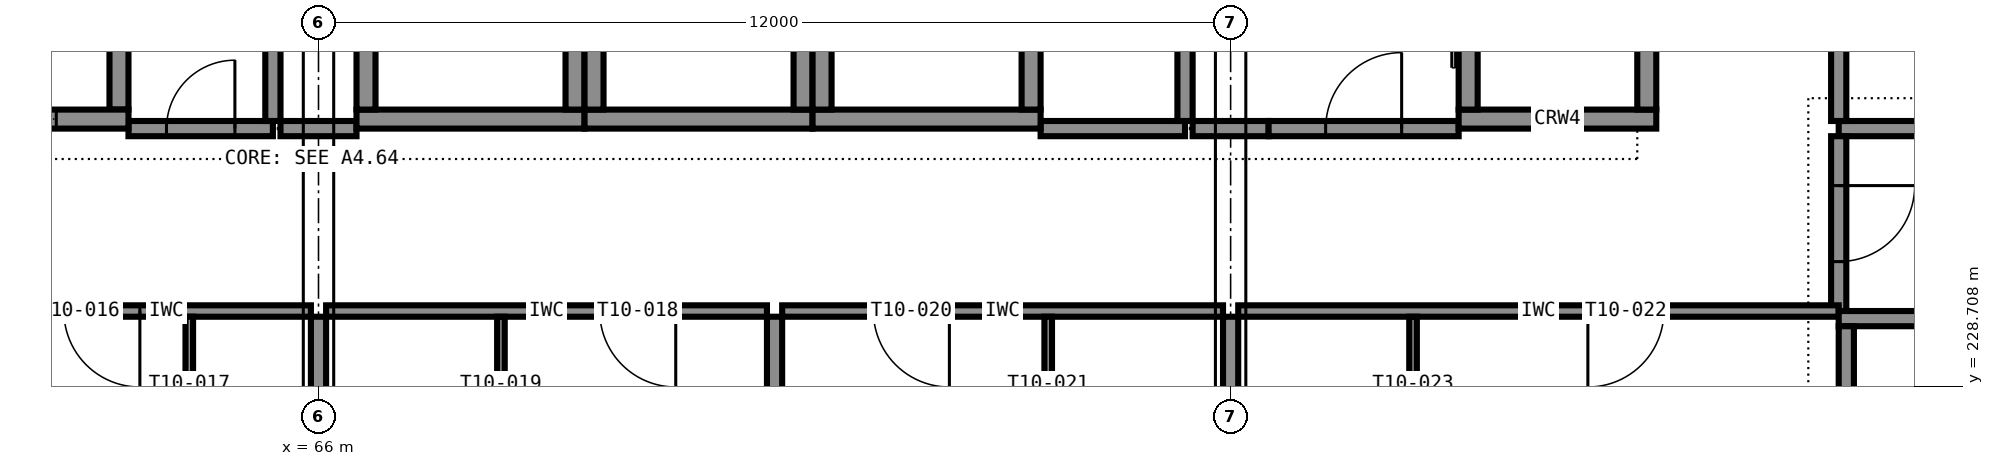
"""IFC4 building model, lengths in metres.
Left out: names, types, materials, properties, quantities, classifications, styles, units other than length and angle.
Written with IfcOpenShell. Run it as: python <this file> out.ifc"""

import sys

from ifc_helpers import new_model, si_unit, direction, frame, frame_2d, origin, place, context, subcontext, project, spatial, rectangle, extrude, element, fill, save


model = new_model("IFC4")
c1 = context("Model", 3, precision=1e-05, world=origin(), true_north=direction((0.0, 1.0)))
c2 = subcontext(c1, "Body", "Model", "MODEL_VIEW")
j1 = project(units=[si_unit("LENGTHUNIT", "METRE"), si_unit("PLANEANGLEUNIT", "RADIAN")], contexts=[c1])
p1 = place(None, origin())
s1 = spatial("IfcSite", under=j1, at=p1, CompositionType="ELEMENT")
p2 = place(p1, origin())
s2 = spatial("IfcBuilding", under=s1, at=p2, CompositionType="ELEMENT")
p3 = place(p2, frame((0.0, 0.0, 49.8)))
s3 = spatial("IfcBuildingStorey", under=s2, at=p3, CompositionType="ELEMENT", Elevation=49.8)
p4 = place(p3, frame((60.5, 232.225, 0.0), z_axis=(0.0, 0.0, 1.0), x_axis=(1.0, 0.0, 0.0)))
e1 = element("IfcWall", 1, at=p4, inside=s3, PredefinedType="SHEAR", context=c2, shape_type="SweptSolid", body=[
    extrude(rectangle(XDim=3.0, YDim=0.25, at=frame_2d((1.5, 0.0))), origin(), (0.0, 0.0, 1.0), 3.6),
])
p5 = place(p4, frame((0.95, 0.0, 0.0)))
e2 = element("IfcOpeningElement", 2, at=p5, cuts=e1, PredefinedType="OPENING", context=c2, shape_type="SweptSolid", body=[
    extrude(rectangle(XDim=1.1, YDim=2.1, at=frame_2d((0.55, 1.05))), frame((0.0, 0.135, 0.0), z_axis=(0.0, -1.0, 0.0), x_axis=(1.0, 0.0, 0.0)), (0.0, 0.0, 1.0), 0.27),
])
p6 = place(p3, frame((63.375, 232.35, 0.0), z_axis=(0.0, 0.0, 1.0), x_axis=(0.0, 1.0, 0.0)))
e3 = element("IfcWall", 3, at=p6, inside=s3, PredefinedType="SHEAR", context=c2, shape_type="SweptSolid", body=[
    extrude(rectangle(XDim=3.3, YDim=0.25, at=frame_2d((1.65, 0.0))), origin(), (0.0, 0.0, 1.0), 3.6),
])
p7 = place(p3, frame((66.5, 232.225, 0.0), z_axis=(0.0, 0.0, 1.0), x_axis=(1.0, 0.0, 0.0)))
e4 = element("IfcWall", 4, at=p7, inside=s3, PredefinedType="SHEAR", context=c2, shape_type="SweptSolid", body=[
    extrude(rectangle(XDim=3.0, YDim=0.25, at=frame_2d((1.5, 0.0))), origin(), (0.0, 0.0, 1.0), 3.6),
])
for number, where, z_axis, x_axis in (
    (5, (66.625, 232.35, 0.0), (0.0, 0.0, 1.0), (0.0, 1.0, 0.0)),
    (6, (69.375, 232.35, 0.0), (0.0, 0.0, 1.0), (0.0, 1.0, 0.0)),
):
    element("IfcWall", number, at=place(p3, frame(where, z_axis=z_axis, x_axis=x_axis)), inside=s3, PredefinedType="SHEAR", context=c2, shape_type="SweptSolid", body=[
        extrude(rectangle(XDim=3.3, YDim=0.25, at=frame_2d((1.65, 0.0))), origin(), (0.0, 0.0, 1.0), 3.6),
    ])
p8 = place(p3, frame((69.5, 232.225, 0.0), z_axis=(0.0, 0.0, 1.0), x_axis=(1.0, 0.0, 0.0)))
e7 = element("IfcWall", 7, at=p8, inside=s3, PredefinedType="SHEAR", context=c2, shape_type="SweptSolid", body=[
    extrude(rectangle(XDim=3.0, YDim=0.25, at=frame_2d((1.5, 0.0))), origin(), (0.0, 0.0, 1.0), 3.6),
])
for number, where, z_axis, x_axis in (
    (8, (69.625, 232.35, 0.0), (0.0, 0.0, 1.0), (0.0, 1.0, 0.0)),
    (9, (72.375, 232.35, 0.0), (0.0, 0.0, 1.0), (0.0, 1.0, 0.0)),
):
    element("IfcWall", number, at=place(p3, frame(where, z_axis=z_axis, x_axis=x_axis)), inside=s3, PredefinedType="SHEAR", context=c2, shape_type="SweptSolid", body=[
        extrude(rectangle(XDim=3.3, YDim=0.25, at=frame_2d((1.65, 0.0))), origin(), (0.0, 0.0, 1.0), 3.6),
    ])
p9 = place(p3, frame((72.5, 232.225, 0.0), z_axis=(0.0, 0.0, 1.0), x_axis=(1.0, 0.0, 0.0)))
e10 = element("IfcWall", 10, at=p9, inside=s3, PredefinedType="SHEAR", context=c2, shape_type="SweptSolid", body=[
    extrude(rectangle(XDim=3.0, YDim=0.25, at=frame_2d((1.5, 0.0))), origin(), (0.0, 0.0, 1.0), 3.6),
])
for number, where, z_axis, x_axis in (
    (11, (72.625, 232.35, 0.0), (0.0, 0.0, 1.0), (0.0, 1.0, 0.0)),
    (12, (75.375, 232.35, 0.0), (0.0, 0.0, 1.0), (0.0, 1.0, 0.0)),
):
    element("IfcWall", number, at=place(p3, frame(where, z_axis=z_axis, x_axis=x_axis)), inside=s3, PredefinedType="SHEAR", context=c2, shape_type="SweptSolid", body=[
        extrude(rectangle(XDim=3.3, YDim=0.25, at=frame_2d((1.65, 0.0))), origin(), (0.0, 0.0, 1.0), 3.6),
    ])
p10 = place(p3, frame((81.0, 232.225, 0.0), z_axis=(0.0, 0.0, 1.0), x_axis=(1.0, 0.0, 0.0)))
e13 = element("IfcWall", 13, at=p10, inside=s3, PredefinedType="SHEAR", context=c2, shape_type="SweptSolid", body=[
    extrude(rectangle(XDim=2.6, YDim=0.25, at=frame_2d((1.3, 0.0))), origin(), (0.0, 0.0, 1.0), 3.6),
])
p11 = place(p3, frame((81.125, 232.35, 0.0), z_axis=(0.0, 0.0, 1.0), x_axis=(0.0, 1.0, 0.0)))
e14 = element("IfcWall", 14, at=p11, inside=s3, PredefinedType="SHEAR", context=c2, shape_type="SweptSolid", body=[
    extrude(rectangle(XDim=3.3, YDim=0.25, at=frame_2d((1.65, 0.0))), origin(), (0.0, 0.0, 1.0), 3.6),
])
p12 = place(p11, frame((1.1, 0.0, 0.0)))
e15 = element("IfcOpeningElement", 15, at=p12, cuts=e14, PredefinedType="OPENING", context=c2, shape_type="SweptSolid", body=[
    extrude(rectangle(XDim=1.1, YDim=2.1, at=frame_2d((0.55, 1.05))), frame((0.0, 0.135, 0.0), z_axis=(0.0, -1.0, 0.0), x_axis=(1.0, 0.0, 0.0)), (0.0, 0.0, 1.0), 0.27),
])
p13 = place(p3, frame((83.475, 232.35, 0.0), z_axis=(0.0, 0.0, 1.0), x_axis=(0.0, 1.0, 0.0)))
e16 = element("IfcWall", 16, at=p13, inside=s3, PredefinedType="SHEAR", context=c2, shape_type="SweptSolid", body=[
    extrude(rectangle(XDim=3.3, YDim=0.25, at=frame_2d((1.65, 0.0))), origin(), (0.0, 0.0, 1.0), 3.6),
])
p14 = place(p3, frame((89.5, 229.6, 0.0), z_axis=(0.0, 0.0, 1.0), x_axis=(-1.0, 0.0, 0.0)))
e17 = element("IfcWall", 17, at=p14, inside=s3, PredefinedType="SHEAR", context=c2, shape_type="SweptSolid", body=[
    extrude(rectangle(XDim=3.5, YDim=0.2, at=frame_2d((1.75, 0.0))), origin(), (0.0, 0.0, 1.0), 3.6),
])
p15 = place(p14, frame((1.15, 0.0, 0.0)))
e18 = element("IfcOpeningElement", 18, at=p15, cuts=e17, PredefinedType="OPENING", context=c2, shape_type="SweptSolid", body=[
    extrude(rectangle(XDim=1.2, YDim=2.1, at=frame_2d((0.6, 1.05))), frame((0.0, 0.11, 0.0), z_axis=(0.0, -1.0, 0.0), x_axis=(1.0, 0.0, 0.0)), (0.0, 0.0, 1.0), 0.22),
])
p16 = place(p3, frame((86.1, 222.0, 0.0), z_axis=(0.0, 0.0, 1.0), x_axis=(0.0, 1.0, 0.0)))
e19 = element("IfcWall", 19, at=p16, inside=s3, PredefinedType="SHEAR", context=c2, shape_type="SweptSolid", body=[
    extrude(rectangle(XDim=7.5, YDim=0.2, at=frame_2d((3.75, 0.0))), origin(), (0.0, 0.0, 1.0), 3.6),
])
p17 = place(p3, frame((63.5, 232.1, 0.0), z_axis=(0.0, 0.0, 1.0), x_axis=(1.0, 0.0, 0.0)))
e20 = element("IfcWall", 20, at=p17, inside=s3, PredefinedType="PARTITIONING", context=c2, shape_type="SweptSolid", body=[
    extrude(rectangle(XDim=1.9, YDim=0.2, at=frame_2d((0.95, 0.0))), origin(), (0.0, 0.0, 1.0), 3.4),
])
p18 = place(p17, frame((0.5, 0.0, 0.0)))
e21 = element("IfcOpeningElement", 21, at=p18, cuts=e20, PredefinedType="OPENING", context=c2, shape_type="SweptSolid", body=[
    extrude(rectangle(XDim=0.9, YDim=2.1, at=frame_2d((0.45, 1.05))), frame((0.0, 0.11, 0.0), z_axis=(0.0, -1.0, 0.0), x_axis=(1.0, 0.0, 0.0)), (0.0, 0.0, 1.0), 0.22),
])
p19 = place(p3, frame((65.5, 232.1, 0.0), z_axis=(0.0, 0.0, 1.0), x_axis=(1.0, 0.0, 0.0)))
e22 = element("IfcWall", 22, at=p19, inside=s3, PredefinedType="PARTITIONING", context=c2, shape_type="SweptSolid", body=[
    extrude(rectangle(XDim=1.0, YDim=0.2, at=frame_2d((0.5, 0.0))), origin(), (0.0, 0.0, 1.0), 3.4),
])
p20 = place(p3, frame((75.5, 232.1, 0.0), z_axis=(0.0, 0.0, 1.0), x_axis=(1.0, 0.0, 0.0)))
e23 = element("IfcWall", 23, at=p20, inside=s3, PredefinedType="PARTITIONING", context=c2, shape_type="SweptSolid", body=[
    extrude(rectangle(XDim=1.9, YDim=0.2, at=frame_2d((0.95, 0.0))), origin(), (0.0, 0.0, 1.0), 3.4),
])
p21 = place(p3, frame((77.5, 232.1, 0.0), z_axis=(0.0, 0.0, 1.0), x_axis=(1.0, 0.0, 0.0)))
e24 = element("IfcWall", 24, at=p21, inside=s3, PredefinedType="PARTITIONING", context=c2, shape_type="SweptSolid", body=[
    extrude(rectangle(XDim=1.0, YDim=0.2, at=frame_2d((0.5, 0.0))), origin(), (0.0, 0.0, 1.0), 3.4),
])
p22 = place(p3, frame((78.5, 232.1, 0.0), z_axis=(0.0, 0.0, 1.0), x_axis=(1.0, 0.0, 0.0)))
e25 = element("IfcWall", 25, at=p22, inside=s3, PredefinedType="PARTITIONING", context=c2, shape_type="SweptSolid", body=[
    extrude(rectangle(XDim=2.5, YDim=0.2, at=frame_2d((1.25, 0.0))), origin(), (0.0, 0.0, 1.0), 3.4),
])
p23 = place(p22, frame((0.75, 0.0, 0.0)))
e26 = element("IfcOpeningElement", 26, at=p23, cuts=e25, PredefinedType="OPENING", context=c2, shape_type="SweptSolid", body=[
    extrude(rectangle(XDim=1.0, YDim=2.1, at=frame_2d((0.5, 1.05))), frame((0.0, 0.11, 0.0), z_axis=(0.0, -1.0, 0.0), x_axis=(1.0, 0.0, 0.0)), (0.0, 0.0, 1.0), 0.22),
])
p24 = place(p3, frame((86.0, 232.1, 0.0), z_axis=(0.0, 0.0, 1.0), x_axis=(1.0, 0.0, 0.0)))
e27 = element("IfcWall", 27, at=p24, inside=s3, PredefinedType="PARTITIONING", context=c2, shape_type="SweptSolid", body=[
    extrude(rectangle(XDim=3.7, YDim=0.2, at=frame_2d((1.85, 0.0))), origin(), (0.0, 0.0, 1.0), 3.4),
])
for number, where, z_axis, x_axis in (
    (28, (65.4, 232.2, 0.0), (0.0, 0.0, 1.0), (0.0, 1.0, 0.0)),
    (29, (77.4, 232.2, 0.0), (0.0, 0.0, 1.0), (0.0, 1.0, 0.0)),
):
    element("IfcWall", number, at=place(p3, frame(where, z_axis=z_axis, x_axis=x_axis)), inside=s3, PredefinedType="PARTITIONING", context=c2, shape_type="SweptSolid", body=[
        extrude(rectangle(XDim=3.6, YDim=0.2, at=frame_2d((1.8, 0.0))), origin(), (0.0, 0.0, 1.0), 3.4),
    ])
p25 = place(p3, frame((86.0, 235.8, 0.0), z_axis=(0.0, 0.0, 1.0), x_axis=(0.0, -1.0, 0.0)))
e30 = element("IfcWall", 30, at=p25, inside=s3, PredefinedType="PARTITIONING", context=c2, shape_type="SweptSolid", body=[
    extrude(rectangle(XDim=3.6, YDim=0.2, at=frame_2d((1.8, 0.0))), origin(), (0.0, 0.0, 1.0), 3.4),
])
p26 = place(p25, frame((1.35, 0.0, 0.0)))
e31 = element("IfcOpeningElement", 31, at=p26, cuts=e30, PredefinedType="OPENING", context=c2, shape_type="SweptSolid", body=[
    extrude(rectangle(XDim=0.9, YDim=2.1, at=frame_2d((0.45, 1.05))), frame((0.0, 0.11, 0.0), z_axis=(0.0, -1.0, 0.0), x_axis=(1.0, 0.0, 0.0)), (0.0, 0.0, 1.0), 0.22),
])
p27 = place(p3, frame((86.0, 232.0, 0.0), z_axis=(0.0, 0.0, 1.0), x_axis=(0.0, -1.0, 0.0)))
e32 = element("IfcWall", 32, at=p27, inside=s3, PredefinedType="PARTITIONING", context=c2, shape_type="SweptSolid", body=[
    extrude(rectangle(XDim=2.3, YDim=0.2, at=frame_2d((1.15, 0.0))), origin(), (0.0, 0.0, 1.0), 3.4),
])
p28 = place(p27, frame((0.65, 0.0, 0.0)))
e33 = element("IfcOpeningElement", 33, at=p28, cuts=e32, PredefinedType="OPENING", context=c2, shape_type="SweptSolid", body=[
    extrude(rectangle(XDim=1.0, YDim=2.1, at=frame_2d((0.5, 1.05))), frame((0.0, 0.11, 0.0), z_axis=(0.0, -1.0, 0.0), x_axis=(1.0, 0.0, 0.0)), (0.0, 0.0, 1.0), 0.22),
])
p29 = place(p3, frame((65.9, 229.7, 0.0), z_axis=(0.0, 0.0, 1.0), x_axis=(-1.0, 0.0, 0.0)))
e34 = element("IfcWall", 34, at=p29, inside=s3, PredefinedType="PARTITIONING", context=c2, shape_type="SweptSolid", body=[
    extrude(rectangle(XDim=3.8, YDim=0.15, at=frame_2d((1.9, 0.0))), origin(), (0.0, 0.0, 1.0), 3.4),
])
p30 = place(p29, frame((2.25, 0.0, 0.0)))
e35 = element("IfcOpeningElement", 35, at=p30, cuts=e34, PredefinedType="OPENING", context=c2, shape_type="SweptSolid", body=[
    extrude(rectangle(XDim=1.0, YDim=2.1, at=frame_2d((0.5, 1.05))), frame((0.0, 0.085, 0.0), z_axis=(0.0, -1.0, 0.0), x_axis=(1.0, 0.0, 0.0)), (0.0, 0.0, 1.0), 0.17),
])
p31 = place(p3, frame((64.3, 226.75, 0.0), z_axis=(0.0, 0.0, 1.0), x_axis=(0.0, 1.0, 0.0)))
e36 = element("IfcWall", 36, at=p31, inside=s3, PredefinedType="PARTITIONING", context=c2, shape_type="SweptSolid", body=[
    extrude(rectangle(XDim=2.875, YDim=0.1, at=frame_2d((1.438, 0.0))), origin(), (0.0, 0.0, 1.0), 3.4),
])
p32 = place(p31, frame((1.038, 0.0, 0.0)))
e37 = element("IfcOpeningElement", 37, at=p32, cuts=e36, PredefinedType="OPENING", context=c2, shape_type="SweptSolid", body=[
    extrude(rectangle(XDim=0.8, YDim=2.1, at=frame_2d((0.4, 1.05))), frame((0.0, 0.06, 0.0), z_axis=(0.0, -1.0, 0.0), x_axis=(1.0, 0.0, 0.0)), (0.0, 0.0, 1.0), 0.12),
])
p33 = place(p3, frame((71.9, 229.7, 0.0), z_axis=(0.0, 0.0, 1.0), x_axis=(-1.0, 0.0, 0.0)))
e38 = element("IfcWall", 38, at=p33, inside=s3, PredefinedType="PARTITIONING", context=c2, shape_type="SweptSolid", body=[
    extrude(rectangle(XDim=5.8, YDim=0.15, at=frame_2d((2.9, 0.0))), origin(), (0.0, 0.0, 1.0), 3.4),
])
p34 = place(p33, frame((1.2, 0.0, 0.0)))
e39 = element("IfcOpeningElement", 39, at=p34, cuts=e38, PredefinedType="OPENING", context=c2, shape_type="SweptSolid", body=[
    extrude(rectangle(XDim=1.0, YDim=2.1, at=frame_2d((0.5, 1.05))), frame((0.0, 0.085, 0.0), z_axis=(0.0, -1.0, 0.0), x_axis=(1.0, 0.0, 0.0)), (0.0, 0.0, 1.0), 0.17),
])
p35 = place(p3, frame((68.4, 229.625, 0.0), z_axis=(0.0, 0.0, 1.0), x_axis=(0.0, -1.0, 0.0)))
e40 = element("IfcWall", 40, at=p35, inside=s3, PredefinedType="PARTITIONING", context=c2, shape_type="SweptSolid", body=[
    extrude(rectangle(XDim=2.875, YDim=0.1, at=frame_2d((1.438, 0.0))), origin(), (0.0, 0.0, 1.0), 3.4),
])
p36 = place(p35, frame((1.038, 0.0, 0.0)))
e41 = element("IfcOpeningElement", 41, at=p36, cuts=e40, PredefinedType="OPENING", context=c2, shape_type="SweptSolid", body=[
    extrude(rectangle(XDim=0.8, YDim=2.1, at=frame_2d((0.4, 1.05))), frame((0.0, 0.06, 0.0), z_axis=(0.0, -1.0, 0.0), x_axis=(1.0, 0.0, 0.0)), (0.0, 0.0, 1.0), 0.12),
])
p37 = place(p3, frame((77.9, 229.7, 0.0), z_axis=(0.0, 0.0, 1.0), x_axis=(-1.0, 0.0, 0.0)))
e42 = element("IfcWall", 42, at=p37, inside=s3, PredefinedType="PARTITIONING", context=c2, shape_type="SweptSolid", body=[
    extrude(rectangle(XDim=5.8, YDim=0.15, at=frame_2d((2.9, 0.0))), origin(), (0.0, 0.0, 1.0), 3.4),
])
p38 = place(p37, frame((3.6, 0.0, 0.0)))
e43 = element("IfcOpeningElement", 43, at=p38, cuts=e42, PredefinedType="OPENING", context=c2, shape_type="SweptSolid", body=[
    extrude(rectangle(XDim=1.0, YDim=2.1, at=frame_2d((0.5, 1.05))), frame((0.0, 0.085, 0.0), z_axis=(0.0, -1.0, 0.0), x_axis=(1.0, 0.0, 0.0)), (0.0, 0.0, 1.0), 0.17),
])
p39 = place(p3, frame((75.6, 226.75, 0.0), z_axis=(0.0, 0.0, 1.0), x_axis=(0.0, 1.0, 0.0)))
e44 = element("IfcWall", 44, at=p39, inside=s3, PredefinedType="PARTITIONING", context=c2, shape_type="SweptSolid", body=[
    extrude(rectangle(XDim=2.875, YDim=0.1, at=frame_2d((1.438, 0.0))), origin(), (0.0, 0.0, 1.0), 3.4),
])
p40 = place(p39, frame((1.038, 0.0, 0.0)))
e45 = element("IfcOpeningElement", 45, at=p40, cuts=e44, PredefinedType="OPENING", context=c2, shape_type="SweptSolid", body=[
    extrude(rectangle(XDim=0.8, YDim=2.1, at=frame_2d((0.4, 1.05))), frame((0.0, 0.06, 0.0), z_axis=(0.0, -1.0, 0.0), x_axis=(1.0, 0.0, 0.0)), (0.0, 0.0, 1.0), 0.12),
])
p41 = place(p3, frame((86.0, 229.7, 0.0), z_axis=(0.0, 0.0, 1.0), x_axis=(-1.0, 0.0, 0.0)))
e46 = element("IfcWall", 46, at=p41, inside=s3, PredefinedType="PARTITIONING", context=c2, shape_type="SweptSolid", body=[
    extrude(rectangle(XDim=7.9, YDim=0.15, at=frame_2d((3.95, 0.0))), origin(), (0.0, 0.0, 1.0), 3.4),
])
p42 = place(p41, frame((2.3, 0.0, 0.0)))
e47 = element("IfcOpeningElement", 47, at=p42, cuts=e46, PredefinedType="OPENING", context=c2, shape_type="SweptSolid", body=[
    extrude(rectangle(XDim=1.0, YDim=2.1, at=frame_2d((0.5, 1.05))), frame((0.0, 0.085, 0.0), z_axis=(0.0, -1.0, 0.0), x_axis=(1.0, 0.0, 0.0)), (0.0, 0.0, 1.0), 0.17),
])
p43 = place(p3, frame((80.4, 229.625, 0.0), z_axis=(0.0, 0.0, 1.0), x_axis=(0.0, -1.0, 0.0)))
e48 = element("IfcWall", 48, at=p43, inside=s3, PredefinedType="PARTITIONING", context=c2, shape_type="SweptSolid", body=[
    extrude(rectangle(XDim=2.875, YDim=0.1, at=frame_2d((1.438, 0.0))), origin(), (0.0, 0.0, 1.0), 3.4),
])
p44 = place(p43, frame((1.038, 0.0, 0.0)))
e49 = element("IfcOpeningElement", 49, at=p44, cuts=e48, PredefinedType="OPENING", context=c2, shape_type="SweptSolid", body=[
    extrude(rectangle(XDim=0.8, YDim=2.1, at=frame_2d((0.4, 1.05))), frame((0.0, 0.06, 0.0), z_axis=(0.0, -1.0, 0.0), x_axis=(1.0, 0.0, 0.0)), (0.0, 0.0, 1.0), 0.12),
])
p45 = place(p3, frame((66.0, 222.35, 0.0), z_axis=(0.0, 0.0, 1.0), x_axis=(0.0, 1.0, 0.0)))
e50 = element("IfcWall", 50, at=p45, inside=s3, PredefinedType="PARTITIONING", context=c2, shape_type="SweptSolid", body=[
    extrude(rectangle(XDim=7.275, YDim=0.2, at=frame_2d((3.637, 0.0))), origin(), (0.0, 0.0, 1.0), 2.6),
])
p46 = place(p3, frame((72.0, 222.3, 0.0), z_axis=(0.0, 0.0, 1.0), x_axis=(0.0, 1.0, 0.0)))
e51 = element("IfcWall", 51, at=p46, inside=s3, PredefinedType="PARTITIONING", context=c2, shape_type="SweptSolid", body=[
    extrude(rectangle(XDim=7.325, YDim=0.2, at=frame_2d((3.663, 0.0))), origin(), (0.0, 0.0, 1.0), 3.4),
])
p47 = place(p3, frame((78.0, 222.35, 0.0), z_axis=(0.0, 0.0, 1.0), x_axis=(0.0, 1.0, 0.0)))
e52 = element("IfcWall", 52, at=p47, inside=s3, PredefinedType="PARTITIONING", context=c2, shape_type="SweptSolid", body=[
    extrude(rectangle(XDim=7.275, YDim=0.2, at=frame_2d((3.637, 0.0))), origin(), (0.0, 0.0, 1.0), 2.6),
])
p48 = place(p18, origin())
e53 = element("IfcDoor", 53, at=p48, inside=s3, OperationType="SINGLE_SWING_RIGHT", PredefinedType="DOOR", context=c2, shape_type="SweptSolid", body=[
    extrude(rectangle(XDim=0.9, YDim=2.1, at=frame_2d((0.45, 1.05))), frame((0.0, 0.025, 0.0), z_axis=(0.0, -1.0, 0.0), x_axis=(1.0, 0.0, 0.0)), (0.0, 0.0, 1.0), 0.05),
])
fill(e21, e53)
p49 = place(p23, origin())
e54 = element("IfcDoor", 54, at=p49, inside=s3, OperationType="SINGLE_SWING_RIGHT", PredefinedType="DOOR", context=c2, shape_type="SweptSolid", body=[
    extrude(rectangle(XDim=1.0, YDim=2.1, at=frame_2d((0.5, 1.05))), frame((0.0, 0.025, 0.0), z_axis=(0.0, -1.0, 0.0), x_axis=(1.0, 0.0, 0.0)), (0.0, 0.0, 1.0), 0.05),
])
fill(e26, e54)
p50 = place(p28, origin())
e55 = element("IfcDoor", 55, at=p50, inside=s3, OperationType="SINGLE_SWING_LEFT", PredefinedType="DOOR", context=c2, shape_type="SweptSolid", body=[
    extrude(rectangle(XDim=1.0, YDim=2.1, at=frame_2d((0.5, 1.05))), frame((0.0, 0.025, 0.0), z_axis=(0.0, -1.0, 0.0), x_axis=(1.0, 0.0, 0.0)), (0.0, 0.0, 1.0), 0.05),
])
fill(e33, e55)
p51 = place(p30, origin())
e56 = element("IfcDoor", 56, at=p51, inside=s3, OperationType="SINGLE_SWING_LEFT", PredefinedType="DOOR", context=c2, shape_type="SweptSolid", body=[
    extrude(rectangle(XDim=1.0, YDim=2.1, at=frame_2d((0.5, 1.05))), frame((0.0, 0.025, 0.0), z_axis=(0.0, -1.0, 0.0), x_axis=(1.0, 0.0, 0.0)), (0.0, 0.0, 1.0), 0.05),
])
fill(e35, e56)
p52 = place(p34, origin())
e57 = element("IfcDoor", 57, at=p52, inside=s3, OperationType="SINGLE_SWING_LEFT", PredefinedType="DOOR", context=c2, shape_type="SweptSolid", body=[
    extrude(rectangle(XDim=1.0, YDim=2.1, at=frame_2d((0.5, 1.05))), frame((0.0, 0.025, 0.0), z_axis=(0.0, -1.0, 0.0), x_axis=(1.0, 0.0, 0.0)), (0.0, 0.0, 1.0), 0.05),
])
fill(e39, e57)
p53 = place(p38, origin())
e58 = element("IfcDoor", 58, at=p53, inside=s3, OperationType="SINGLE_SWING_LEFT", PredefinedType="DOOR", context=c2, shape_type="SweptSolid", body=[
    extrude(rectangle(XDim=1.0, YDim=2.1, at=frame_2d((0.5, 1.05))), frame((0.0, 0.025, 0.0), z_axis=(0.0, -1.0, 0.0), x_axis=(1.0, 0.0, 0.0)), (0.0, 0.0, 1.0), 0.05),
])
fill(e43, e58)
p54 = place(p42, origin())
e59 = element("IfcDoor", 59, at=p54, inside=s3, OperationType="SINGLE_SWING_RIGHT", PredefinedType="DOOR", context=c2, shape_type="SweptSolid", body=[
    extrude(rectangle(XDim=1.0, YDim=2.1, at=frame_2d((0.5, 1.05))), frame((0.0, 0.025, 0.0), z_axis=(0.0, -1.0, 0.0), x_axis=(1.0, 0.0, 0.0)), (0.0, 0.0, 1.0), 0.05),
])
fill(e47, e59)
p55 = place(p5, origin())
e60 = element("IfcDoor", 60, at=p55, inside=s3, OperationType="SLIDING_TO_LEFT", PredefinedType="DOOR", context=c2, shape_type="SweptSolid", body=[
    extrude(rectangle(XDim=1.1, YDim=2.1, at=frame_2d((0.55, 1.05))), frame((0.0, 0.025, 0.0), z_axis=(0.0, -1.0, 0.0), x_axis=(1.0, 0.0, 0.0)), (0.0, 0.0, 1.0), 0.05),
])
fill(e2, e60)
save(model, sys.argv[1])
